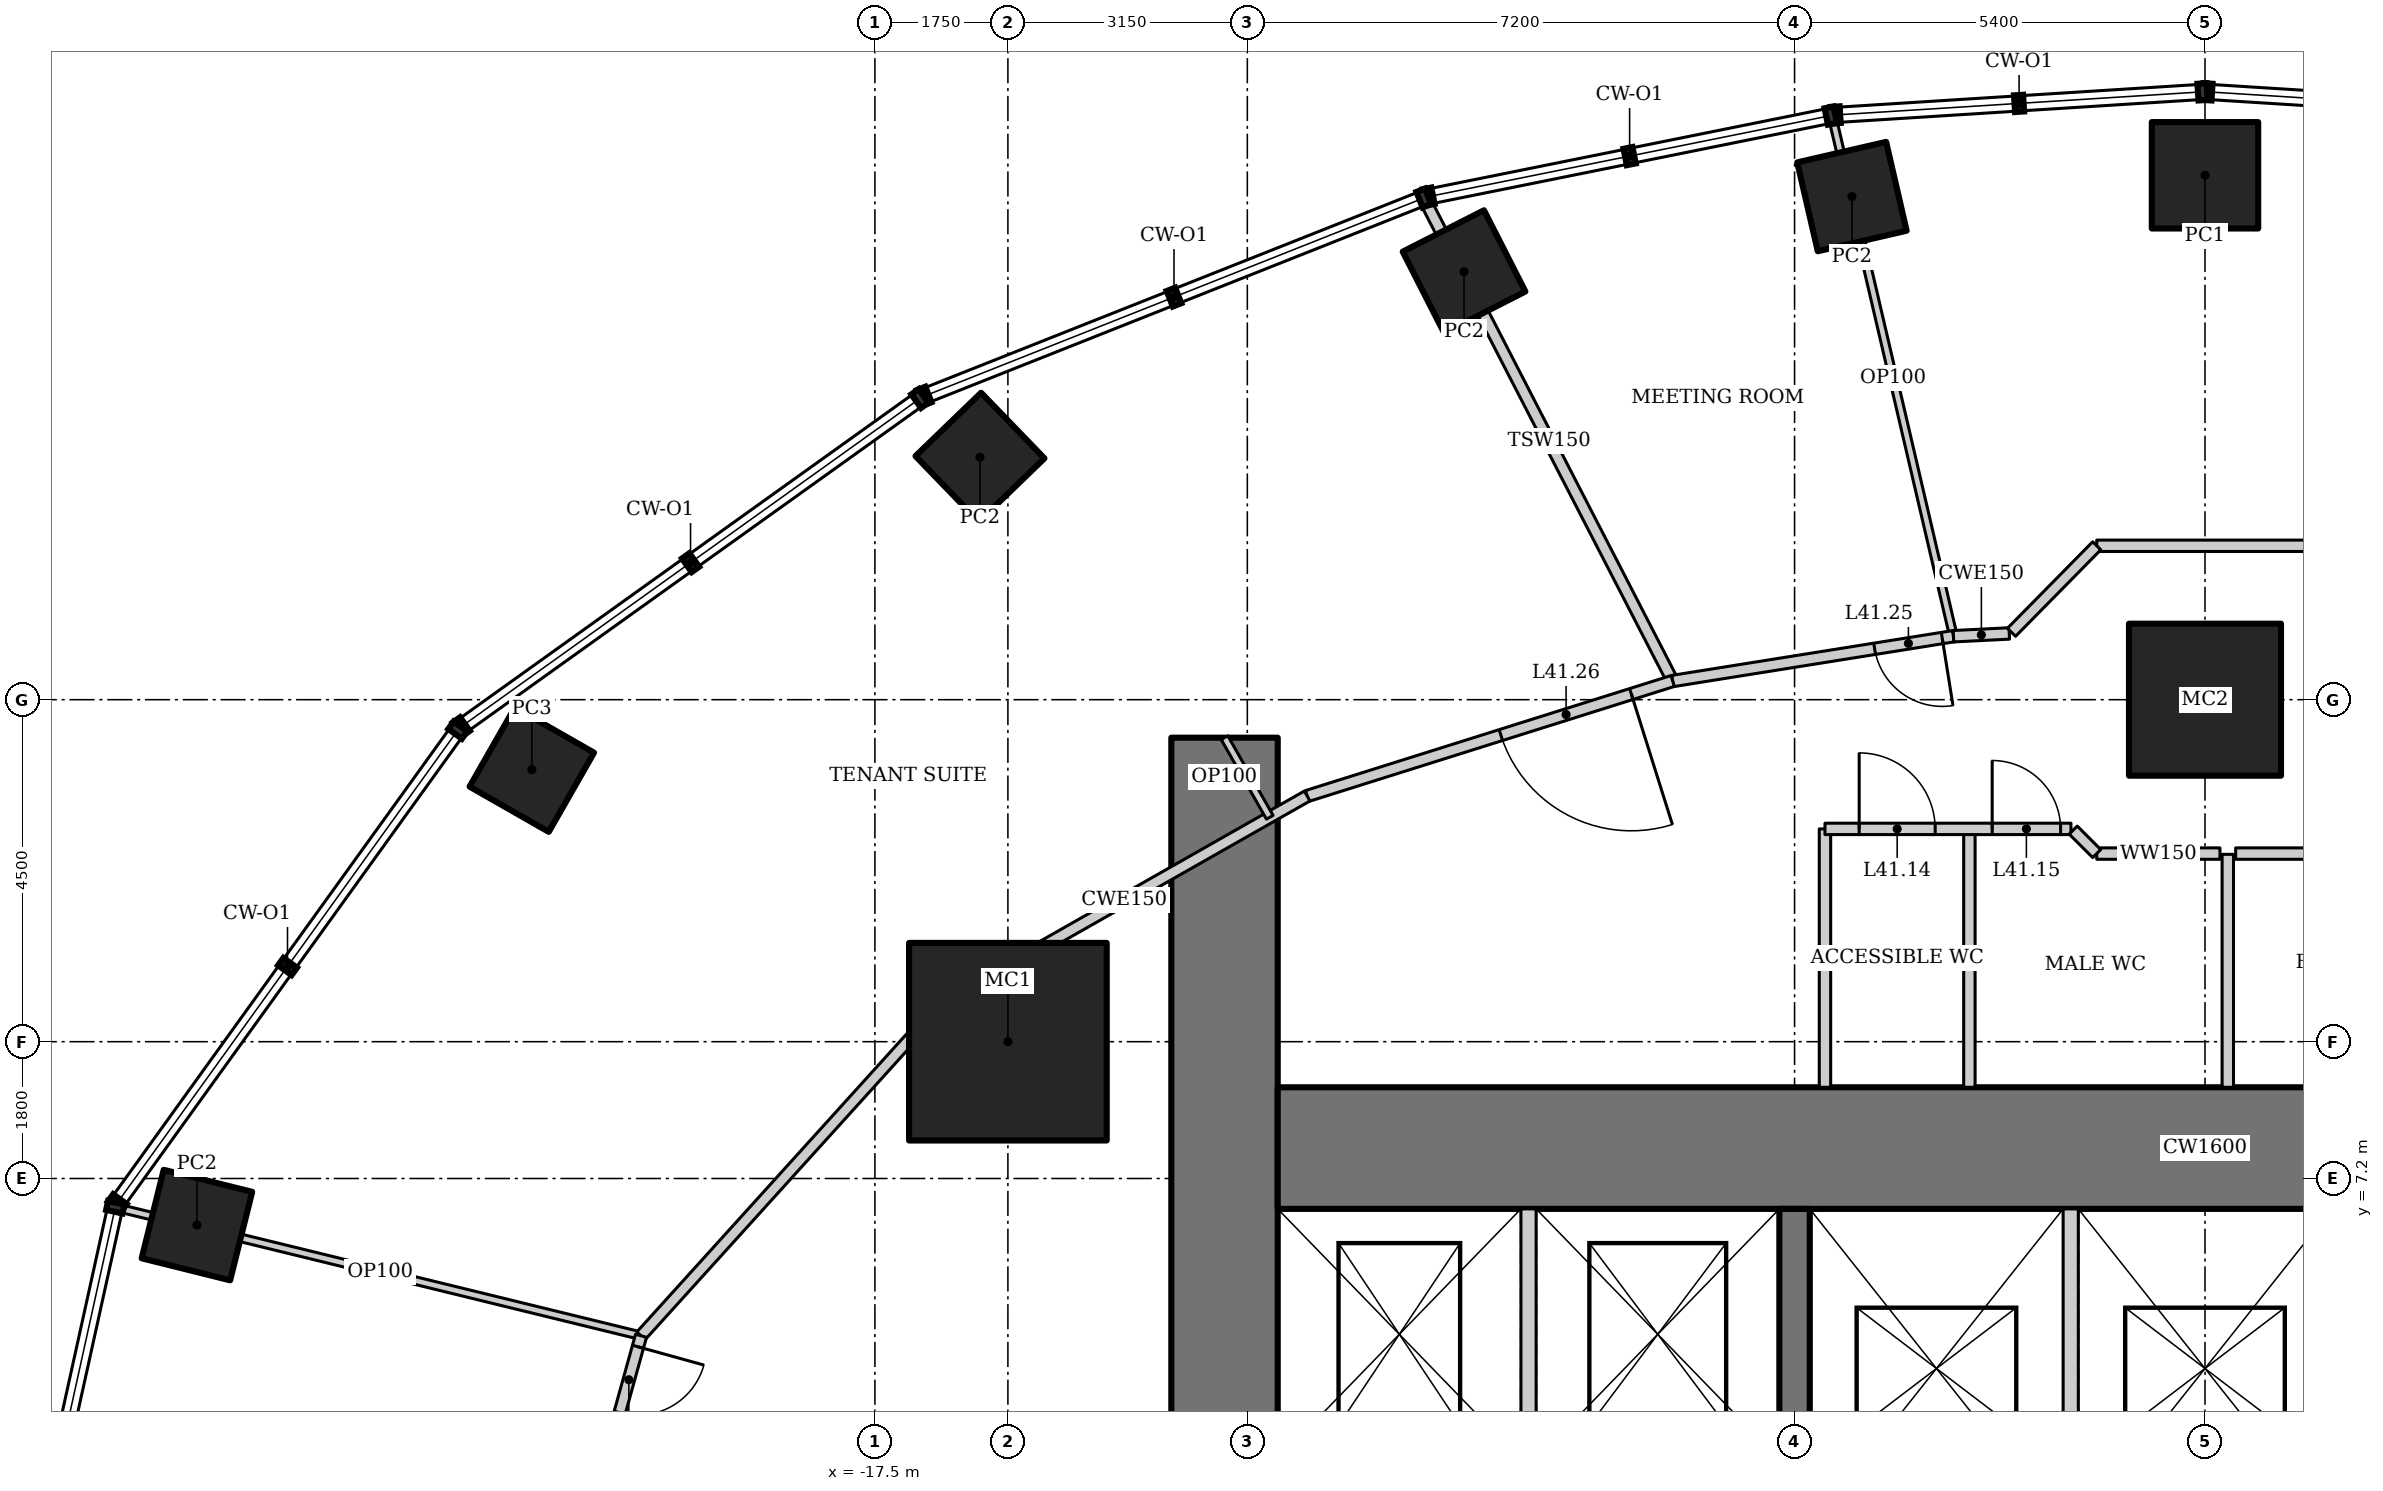
"""IFC4 building model, lengths in metres.
Left out: names, types, materials, properties, quantities, classifications, styles, units other than length and angle.
Written with IfcOpenShell. Run it as: python <this file> out.ifc"""

import sys

from ifc_helpers import new_model, si_unit, direction, frame, frame_2d, origin, origin_2d, place, context, subcontext, project, spatial, rectangle, hollow_rectangle, extrude, element, fill, save


model = new_model("IFC4")
c1 = context("Model", 3, precision=1e-05, world=origin(), true_north=direction((0.0, 1.0)))
c2 = subcontext(c1, "Body", "Model", "MODEL_VIEW")
j1 = project(units=[si_unit("LENGTHUNIT", "METRE"), si_unit("PLANEANGLEUNIT", "RADIAN")], contexts=[c1])
p1 = place(None, origin())
s1 = spatial("IfcSite", under=j1, at=p1, CompositionType="ELEMENT")
p2 = place(p1, origin())
s2 = spatial("IfcBuilding", under=s1, at=p2, CompositionType="ELEMENT")
p3 = place(p2, frame((0.0, 0.0, 176.2)))
s3 = spatial("IfcBuildingStorey", under=s2, at=p3, CompositionType="ELEMENT", Elevation=176.2)
p4 = place(p3, frame((0.0, 13.5, 0.0), z_axis=(0.0, 0.0, 1.0), x_axis=(1.0, 0.0, 0.0)))
e1 = element("IfcColumn", 1, at=p4, inside=s3, PredefinedType="COLUMN", context=c2, shape_type="SweptSolid", body=[
    extrude(hollow_rectangle(XDim=2.0, YDim=2.0, WallThickness=0.17, at=origin_2d()), origin(), (0.0, 0.0, 1.0), 4.2),
])
p5 = place(p3, frame((-15.75, 9.0, 0.0), z_axis=(0.0, 0.0, 1.0), x_axis=(1.0, 0.0, 0.0)))
e2 = element("IfcColumn", 2, at=p5, inside=s3, PredefinedType="COLUMN", context=c2, shape_type="SweptSolid", body=[
    extrude(hollow_rectangle(XDim=2.6, YDim=2.6, WallThickness=0.13, at=origin_2d()), origin(), (0.0, 0.0, 1.0), 4.2),
])
p6 = place(p3, frame((0.0, 20.4, 0.0), z_axis=(0.0, 0.0, 1.0), x_axis=(1.0, 0.0, 0.0)))
e3 = element("IfcColumn", 3, at=p6, inside=s3, PredefinedType="COLUMN", context=c2, shape_type="SweptSolid", body=[
    extrude(hollow_rectangle(XDim=1.4, YDim=1.4, WallThickness=0.1, at=origin_2d()), origin(), (0.0, 0.0, 1.0), 4.2),
])
for number, where, z_axis, x_axis in (
    (4, (-4.645, 20.12, 0.0), (0.0, 0.0, 1.0), (0.974, 0.225, 0.0)),
    (5, (-9.749, 19.133, 0.0), (0.0, 0.0, 1.0), (0.891, 0.454, 0.0)),
    (6, (-16.118, 16.69, 0.0), (0.0, 0.0, 1.0), (0.719, 0.695, 0.0)),
):
    element("IfcColumn", number, at=place(p3, frame(where, z_axis=z_axis, x_axis=x_axis)), inside=s3, PredefinedType="COLUMN", context=c2, shape_type="SweptSolid", body=[
        extrude(hollow_rectangle(XDim=1.2, YDim=1.2, WallThickness=0.1, at=origin_2d()), origin(), (0.0, 0.0, 1.0), 4.2),
    ])
p7 = place(p3, frame((-22.014, 12.579, 0.0), z_axis=(0.0, 0.0, 1.0), x_axis=(0.496139221777, 0.86824298017, 0.0)))
e7 = element("IfcColumn", 7, at=p7, inside=s3, PredefinedType="COLUMN", context=c2, shape_type="SweptSolid", body=[
    extrude(hollow_rectangle(XDim=1.2, YDim=1.2, WallThickness=0.12, at=origin_2d()), origin(), (0.0, 0.0, 1.0), 4.2),
])
p8 = place(p3, frame((-26.42, 6.587, 0.0), z_axis=(0.0, 0.0, 1.0), x_axis=(0.2419218956, 0.970295726276, 0.0)))
e8 = element("IfcColumn", 8, at=p8, inside=s3, PredefinedType="COLUMN", context=c2, shape_type="SweptSolid", body=[
    extrude(hollow_rectangle(XDim=1.2, YDim=1.2, WallThickness=0.1, at=origin_2d()), origin(), (0.0, 0.0, 1.0), 4.2),
])
p9 = place(p3, frame((-12.9, 13.0, 0.0), z_axis=(0.0, 0.0, 1.0), x_axis=(0.0, -1.0, 0.0)))
e9 = element("IfcWall", 9, at=p9, inside=s3, PredefinedType="SHEAR", context=c2, shape_type="SweptSolid", body=[
    extrude(rectangle(XDim=26.0, YDim=1.4, at=frame_2d((13.0, 0.0))), origin(), (0.0, 0.0, 1.0), 4.2),
])
p10 = place(p9, frame((12.1, 0.0, 0.0)))
e10 = element("IfcOpeningElement", 10, at=p10, cuts=e9, PredefinedType="OPENING", context=c2, shape_type="SweptSolid", body=[
    extrude(rectangle(XDim=1.8, YDim=2.1, at=frame_2d((0.9, 1.05))), frame((0.0, 0.71, 0.0), z_axis=(0.0, -1.0, 0.0), x_axis=(1.0, 0.0, 0.0)), (0.0, 0.0, 1.0), 1.42),
])
p11 = place(p3, frame((12.2, 7.6, 0.0), z_axis=(0.0, 0.0, 1.0), x_axis=(-1.0, 0.0, 0.0)))
e11 = element("IfcWall", 11, at=p11, inside=s3, PredefinedType="SHEAR", context=c2, shape_type="SweptSolid", body=[
    extrude(rectangle(XDim=24.4, YDim=1.6, at=frame_2d((12.2, 0.0))), origin(), (0.0, 0.0, 1.0), 4.2),
])
p12 = place(p3, frame((-5.4, 6.8, 0.0), z_axis=(0.0, 0.0, 1.0), x_axis=(0.0, -1.0, 0.0)))
e12 = element("IfcWall", 12, at=p12, inside=s3, PredefinedType="SHEAR", context=c2, shape_type="SweptSolid", body=[
    extrude(rectangle(XDim=13.6, YDim=0.4, at=frame_2d((6.8, 0.0))), origin(), (0.0, 0.0, 1.0), 4.2),
])
p13 = place(p12, frame((5.9, 0.0, 0.0)))
e13 = element("IfcOpeningElement", 13, at=p13, cuts=e12, PredefinedType="OPENING", context=c2, shape_type="SweptSolid", body=[
    extrude(rectangle(XDim=1.8, YDim=2.1, at=frame_2d((0.9, 1.05))), frame((0.0, 0.21, 0.0), z_axis=(0.0, -1.0, 0.0), x_axis=(1.0, 0.0, 0.0)), (0.0, 0.0, 1.0), 0.42),
])
p14 = place(p3, frame((-1.767, 2.6, 0.0), z_axis=(0.0, 0.0, 1.0), x_axis=(0.0, 1.0, 0.0)))
e14 = element("IfcWall", 14, at=p14, inside=s3, PredefinedType="SOLIDWALL", context=c2, shape_type="SweptSolid", body=[
    extrude(rectangle(XDim=4.2, YDim=0.2, at=frame_2d((2.1, 0.0))), origin(), (0.0, 0.0, 1.0), 4.2),
])
p15 = place(p3, frame((-8.9, 3.5, 0.0), z_axis=(0.0, 0.0, 1.0), x_axis=(0.0, 1.0, 0.0)))
e15 = element("IfcWall", 15, at=p15, inside=s3, PredefinedType="SOLIDWALL", context=c2, shape_type="SweptSolid", body=[
    extrude(rectangle(XDim=3.3, YDim=0.2, at=frame_2d((1.65, 0.0))), origin(), (0.0, 0.0, 1.0), 4.2),
])
p16 = place(p3, frame((-4.897, 21.135, 0.0), z_axis=(0.0, 0.0, 1.0), x_axis=(0.22733572198, -0.973816445493, 0.0)))
e16 = element("IfcWall", 16, at=p16, inside=s3, PredefinedType="PARTITIONING", context=c2, shape_type="SweptSolid", body=[
    extrude(rectangle(XDim=6.983, YDim=0.1, at=frame_2d((3.491, 0.0))), origin(), (0.0, 0.0, 1.0), 3.293),
])
p17 = place(p3, frame((-10.253, 20.052, 0.0), z_axis=(0.0, 0.0, 1.0), x_axis=(0.458082677592, -0.888909590729, 0.0)))
e17 = element("IfcWall", 17, at=p17, inside=s3, PredefinedType="PARTITIONING", context=c2, shape_type="SweptSolid", body=[
    extrude(rectangle(XDim=7.094, YDim=0.15, at=frame_2d((3.547, 0.0))), origin(), (0.0, 0.0, 1.0), 3.349),
])
p18 = place(p3, frame((-27.441, 6.809, 0.0), z_axis=(0.0, 0.0, 1.0), x_axis=(0.971377572955, -0.237540755996, 0.0)))
e18 = element("IfcWall", 18, at=p18, inside=s3, PredefinedType="PARTITIONING", context=c2, shape_type="SweptSolid", body=[
    extrude(rectangle(XDim=7.066, YDim=0.1, at=frame_2d((3.533, 0.0))), origin(), (0.0, 0.0, 1.0), 3.113),
])
p19 = place(p3, frame((-3.31, 14.335, 0.0), z_axis=(0.0, 0.0, 1.0), x_axis=(-0.987511396594, -0.157547585181, 0.0)))
e19 = element("IfcWall", 19, at=p19, inside=s3, PredefinedType="PARTITIONING", context=c2, shape_type="SweptSolid", body=[
    extrude(rectangle(XDim=3.741, YDim=0.15, at=frame_2d((1.87, 0.0))), origin(), (0.0, 0.0, 1.0), 4.05),
])
p20 = place(p19, frame((0.15, 0.0, 0.0)))
e20 = element("IfcOpeningElement", 20, at=p20, cuts=e19, PredefinedType="OPENING", context=c2, shape_type="SweptSolid", body=[
    extrude(rectangle(XDim=0.9, YDim=2.1, at=frame_2d((0.45, 1.05))), frame((0.0, 0.085, 0.0), z_axis=(0.0, -1.0, 0.0), x_axis=(1.0, 0.0, 0.0)), (0.0, 0.0, 1.0), 0.17),
])
p21 = place(p3, frame((-7.004, 13.746, 0.0), z_axis=(0.0, 0.0, 1.0), x_axis=(-0.953893934057, -0.300143903101, 0.0)))
e21 = element("IfcWall", 21, at=p21, inside=s3, PredefinedType="PARTITIONING", context=c2, shape_type="SweptSolid", body=[
    extrude(rectangle(XDim=5.042, YDim=0.15, at=frame_2d((2.521, 0.0))), origin(), (0.0, 0.0, 1.0), 4.05),
])
p22 = place(p21, frame((0.57, 0.0, 0.0)))
e22 = element("IfcOpeningElement", 22, at=p22, cuts=e21, PredefinedType="OPENING", context=c2, shape_type="SweptSolid", body=[
    extrude(rectangle(XDim=1.8, YDim=2.1, at=frame_2d((0.9, 1.05))), frame((0.0, 0.085, 0.0), z_axis=(0.0, -1.0, 0.0), x_axis=(1.0, 0.0, 0.0)), (0.0, 0.0, 1.0), 0.17),
])
p23 = place(p3, frame((-11.813, 12.232, 0.0), z_axis=(0.0, 0.0, 1.0), x_axis=(-0.869375991036, -0.494151177485, 0.0)))
e23 = element("IfcWall", 23, at=p23, inside=s3, PredefinedType="PARTITIONING", context=c2, shape_type="SweptSolid", body=[
    extrude(rectangle(XDim=5.532, YDim=0.15, at=frame_2d((2.766, 0.0))), origin(), (0.0, 0.0, 1.0), 4.05),
])
p24 = place(p3, frame((-16.623, 9.499, 0.0), z_axis=(0.0, 0.0, 1.0), x_axis=(-0.671118353743, -0.741350224435, 0.0)))
e24 = element("IfcWall", 24, at=p24, inside=s3, PredefinedType="PARTITIONING", context=c2, shape_type="SweptSolid", body=[
    extrude(rectangle(XDim=5.892, YDim=0.15, at=frame_2d((2.946, 0.0))), origin(), (0.0, 0.0, 1.0), 4.05),
])
p25 = place(p3, frame((-20.577, 5.13, 0.0), z_axis=(0.0, 0.0, 1.0), x_axis=(-0.267293817428, -0.963615076244, 0.0)))
e25 = element("IfcWall", 25, at=p25, inside=s3, PredefinedType="PARTITIONING", context=c2, shape_type="SweptSolid", body=[
    extrude(rectangle(XDim=5.324, YDim=0.15, at=frame_2d((2.662, 0.0))), origin(), (0.0, 0.0, 1.0), 4.05),
])
p26 = place(p25, frame((0.15, 0.0, 0.0)))
e26 = element("IfcOpeningElement", 26, at=p26, cuts=e25, PredefinedType="OPENING", context=c2, shape_type="SweptSolid", body=[
    extrude(rectangle(XDim=0.9, YDim=2.1, at=frame_2d((0.45, 1.05))), frame((0.0, 0.085, 0.0), z_axis=(0.0, -1.0, 0.0), x_axis=(1.0, 0.0, 0.0)), (0.0, 0.0, 1.0), 0.17),
])
for number, where, z_axis, x_axis in (
    (27, (-5.0, 8.4, 0.0), (0.0, 0.0, 1.0), (0.0, 1.0, 0.0)),
    (28, (-3.1, 8.4, 0.0), (0.0, 0.0, 1.0), (0.0, 1.0, 0.0)),
):
    element("IfcWall", number, at=place(p3, frame(where, z_axis=z_axis, x_axis=x_axis)), inside=s3, PredefinedType="SOLIDWALL", context=c2, shape_type="SweptSolid", body=[
        extrude(rectangle(XDim=3.4, YDim=0.15, at=frame_2d((1.7, 0.0))), origin(), (0.0, 0.0, 1.0), 4.05),
    ])
p27 = place(p3, frame((-12.9, 13.0, 0.0), z_axis=(0.0, 0.0, 1.0), x_axis=(0.494173075358, -0.869363543974, 0.0)))
e29 = element("IfcWall", 29, at=p27, inside=s3, PredefinedType="PARTITIONING", context=c2, shape_type="SweptSolid", body=[
    extrude(rectangle(XDim=1.204, YDim=0.1, at=frame_2d((0.602, 0.0))), origin(), (0.0, 0.0, 1.0), 4.05),
])
p28 = place(p3, frame((-2.575, 14.372, 0.0), z_axis=(0.0, 0.0, 1.0), x_axis=(-0.998758954215, -0.04980513402, 0.0)))
e30 = element("IfcWall", 30, at=p28, inside=s3, PredefinedType="PARTITIONING", context=c2, shape_type="SweptSolid", body=[
    extrude(rectangle(XDim=0.735, YDim=0.15, at=frame_2d((0.368, 0.0))), origin(), (0.0, 0.0, 1.0), 4.05),
])
p29 = place(p3, frame((-5.0, 11.8, 0.0), z_axis=(0.0, 0.0, 1.0), x_axis=(1.0, 0.0, 0.0)))
e31 = element("IfcWall", 31, at=p29, inside=s3, PredefinedType="SOLIDWALL", context=c2, shape_type="SweptSolid", body=[
    extrude(rectangle(XDim=3.236, YDim=0.15, at=frame_2d((1.618, 0.0))), origin(), (0.0, 0.0, 1.0), 4.05),
])
p30 = place(p29, frame((0.45, 0.0, 0.0)))
e32 = element("IfcOpeningElement", 32, at=p30, cuts=e31, PredefinedType="OPENING", context=c2, shape_type="SweptSolid", body=[
    extrude(rectangle(XDim=1.0, YDim=2.1, at=frame_2d((0.5, 1.05))), frame((0.0, 0.085, 0.0), z_axis=(0.0, -1.0, 0.0), x_axis=(1.0, 0.0, 0.0)), (0.0, 0.0, 1.0), 0.17),
])
p31 = place(p29, frame((2.2, 0.0, 0.0)))
e33 = element("IfcOpeningElement", 33, at=p31, cuts=e31, PredefinedType="OPENING", context=c2, shape_type="SweptSolid", body=[
    extrude(rectangle(XDim=0.9, YDim=2.1, at=frame_2d((0.45, 1.05))), frame((0.0, 0.085, 0.0), z_axis=(0.0, -1.0, 0.0), x_axis=(1.0, 0.0, 0.0)), (0.0, 0.0, 1.0), 0.17),
])
p32 = place(p3, frame((0.3, 8.4, 0.0), z_axis=(0.0, 0.0, 1.0), x_axis=(0.0, 1.0, 0.0)))
e34 = element("IfcWall", 34, at=p32, inside=s3, PredefinedType="SOLIDWALL", context=c2, shape_type="SweptSolid", body=[
    extrude(rectangle(XDim=3.065, YDim=0.15, at=frame_2d((1.533, 0.0))), origin(), (0.0, 0.0, 1.0), 4.05),
])
p33 = place(p3, frame((0.197, 11.475, 0.0), z_axis=(0.0, 0.0, 1.0), x_axis=(-1.0, 0.0, 0.0)))
e35 = element("IfcWall", 35, at=p33, inside=s3, PredefinedType="SOLIDWALL", context=c2, shape_type="SweptSolid", body=[
    extrude(rectangle(XDim=1.621, YDim=0.15, at=frame_2d((0.811, 0.0))), origin(), (0.0, 0.0, 1.0), 4.05),
])
p34 = place(p3, frame((-1.425, 11.475, 0.0), z_axis=(0.0, 0.0, 1.0), x_axis=(-0.707106781187, 0.707106781187, 0.0)))
e36 = element("IfcWall", 36, at=p34, inside=s3, PredefinedType="SOLIDWALL", context=c2, shape_type="SweptSolid", body=[
    extrude(rectangle(XDim=0.437, YDim=0.15, at=frame_2d((0.219, 0.0))), origin(), (0.0, 0.0, 1.0), 4.05),
])
p35 = place(p3, frame((1.425, 11.475, 0.0), z_axis=(0.0, 0.0, 1.0), x_axis=(-1.0, 0.0, 0.0)))
e37 = element("IfcWall", 37, at=p35, inside=s3, PredefinedType="SOLIDWALL", context=c2, shape_type="SweptSolid", body=[
    extrude(rectangle(XDim=1.021, YDim=0.15, at=frame_2d((0.511, 0.0))), origin(), (0.0, 0.0, 1.0), 4.05),
])
p36 = place(p3, frame((-1.425, 15.525, 0.0), z_axis=(0.0, 0.0, 1.0), x_axis=(1.0, 0.0, 0.0)))
e38 = element("IfcWall", 38, at=p36, inside=s3, PredefinedType="PARTITIONING", context=c2, shape_type="SweptSolid", body=[
    extrude(rectangle(XDim=2.849, YDim=0.15, at=frame_2d((1.425, 0.0))), origin(), (0.0, 0.0, 1.0), 4.05),
])
p37 = place(p3, frame((-2.546, 14.387, 0.0), z_axis=(0.0, 0.0, 1.0), x_axis=(0.701815492047, 0.712358768545, 0.0)))
e39 = element("IfcWall", 39, at=p37, inside=s3, PredefinedType="PARTITIONING", context=c2, shape_type="SweptSolid", body=[
    extrude(rectangle(XDim=1.598, YDim=0.15, at=frame_2d((0.799, 0.0))), origin(), (0.0, 0.0, 1.0), 4.05),
])
p38 = place(p30, origin())
e40 = element("IfcDoor", 40, at=p38, inside=s3, OperationType="SINGLE_SWING_LEFT", PredefinedType="DOOR", context=c2, shape_type="SweptSolid", body=[
    extrude(rectangle(XDim=1.0, YDim=2.1, at=frame_2d((0.5, 1.05))), frame((0.0, 0.025, 0.0), z_axis=(0.0, -1.0, 0.0), x_axis=(1.0, 0.0, 0.0)), (0.0, 0.0, 1.0), 0.05),
])
fill(e32, e40)
p39 = place(p31, origin())
e41 = element("IfcDoor", 41, at=p39, inside=s3, OperationType="SINGLE_SWING_LEFT", PredefinedType="DOOR", context=c2, shape_type="SweptSolid", body=[
    extrude(rectangle(XDim=0.9, YDim=2.1, at=frame_2d((0.45, 1.05))), frame((0.0, 0.025, 0.0), z_axis=(0.0, -1.0, 0.0), x_axis=(1.0, 0.0, 0.0)), (0.0, 0.0, 1.0), 0.05),
])
fill(e33, e41)
p40 = place(p20, origin())
e42 = element("IfcDoor", 42, at=p40, inside=s3, OperationType="SINGLE_SWING_LEFT", PredefinedType="DOOR", context=c2, shape_type="SweptSolid", body=[
    extrude(rectangle(XDim=0.9, YDim=2.1, at=frame_2d((0.45, 1.05))), frame((0.0, 0.025, 0.0), z_axis=(0.0, -1.0, 0.0), x_axis=(1.0, 0.0, 0.0)), (0.0, 0.0, 1.0), 0.05),
])
fill(e20, e42)
p41 = place(p22, origin())
e43 = element("IfcDoor", 43, at=p41, inside=s3, OperationType="DOUBLE_DOOR_DOUBLE_SWING", PredefinedType="DOOR", context=c2, shape_type="SweptSolid", body=[
    extrude(rectangle(XDim=1.8, YDim=2.1, at=frame_2d((0.9, 1.05))), frame((0.0, 0.025, 0.0), z_axis=(0.0, -1.0, 0.0), x_axis=(1.0, 0.0, 0.0)), (0.0, 0.0, 1.0), 0.05),
])
fill(e22, e43)
p42 = place(p26, origin())
e44 = element("IfcDoor", 44, at=p42, inside=s3, OperationType="SINGLE_SWING_LEFT", PredefinedType="DOOR", context=c2, shape_type="SweptSolid", body=[
    extrude(rectangle(XDim=0.9, YDim=2.1, at=frame_2d((0.45, 1.05))), frame((0.0, 0.025, 0.0), z_axis=(0.0, -1.0, 0.0), x_axis=(1.0, 0.0, 0.0)), (0.0, 0.0, 1.0), 0.05),
])
fill(e26, e44)
save(model, sys.argv[1])
